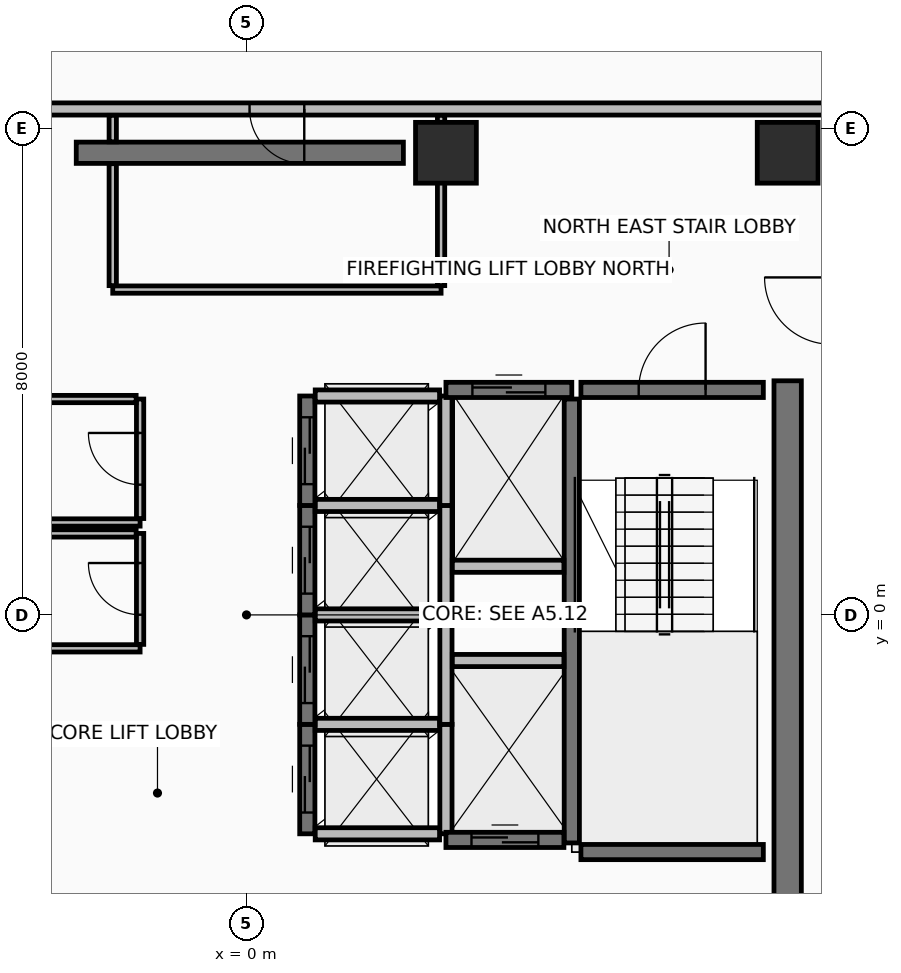
"""IFC4 building model, lengths in metres.
Left out: names, types, materials, properties, quantities, classifications, styles, units other than length and angle.
Written with IfcOpenShell. Run it as: python <this file> out.ifc"""

import sys

from ifc_helpers import new_model, si_unit, direction, frame, frame_2d, origin, origin_2d, place, context, subcontext, project, spatial, rectangle, extrude, element, fill, save


model = new_model("IFC4")
c1 = context("Model", 3, precision=1e-05, world=origin(), true_north=direction((0.0, 1.0)))
c2 = subcontext(c1, "Body", "Model", "MODEL_VIEW")
j1 = project(units=[si_unit("LENGTHUNIT", "METRE"), si_unit("PLANEANGLEUNIT", "RADIAN")], contexts=[c1])
p1 = place(None, origin())
s1 = spatial("IfcSite", under=j1, at=p1, CompositionType="ELEMENT")
p2 = place(p1, origin())
s2 = spatial("IfcBuilding", under=s1, at=p2, CompositionType="ELEMENT")
p3 = place(p2, frame((0.0, 0.0, 237.85)))
s3 = spatial("IfcBuildingStorey", under=s2, at=p3, CompositionType="ELEMENT", Elevation=237.85)
for number, where, z_axis, x_axis in (
    (1, (8.9, 7.6, 0.0), (0.0, 0.0, 1.0), (1.0, 0.0, 0.0)),
    (2, (3.28, 7.6, 0.0), (0.0, 0.0, 1.0), (1.0, 0.0, 0.0)),
):
    element("IfcColumn", number, at=place(p3, frame(where, z_axis=z_axis, x_axis=x_axis)), inside=s3, PredefinedType="COLUMN", context=c2, shape_type="SweptSolid", body=[
        extrude(rectangle(XDim=1.0, YDim=1.0, at=origin_2d()), origin(), (0.0, 0.0, 1.0), 3.6),
    ])
p4 = place(p3, frame((-2.8, 7.6, 0.0), z_axis=(0.0, 0.0, 1.0), x_axis=(1.0, 0.0, 0.0)))
e3 = element("IfcWall", 3, at=p4, inside=s3, PredefinedType="SHEAR", context=c2, shape_type="SweptSolid", body=[
    extrude(rectangle(XDim=5.38, YDim=0.35, at=frame_2d((2.69, 0.0))), origin(), (0.0, 0.0, 1.0), 3.42),
])
p5 = place(p3, frame((8.9, -6.85, 0.0), z_axis=(0.0, 0.0, 1.0), x_axis=(0.0, 1.0, 0.0)))
e4 = element("IfcWall", 4, at=p5, inside=s3, PredefinedType="SHEAR", context=c2, shape_type="SweptSolid", body=[
    extrude(rectangle(XDim=10.7, YDim=0.45, at=frame_2d((5.35, 0.0))), origin(), (0.0, 0.0, 1.0), 3.42),
])
p6 = place(p3, frame((9.62, 8.32, 0.0), z_axis=(0.0, 0.0, 1.0), x_axis=(-1.0, 0.0, 0.0)))
e5 = element("IfcWall", 5, at=p6, inside=s3, PredefinedType="PARTITIONING", context=c2, shape_type="SweptSolid", body=[
    extrude(rectangle(XDim=19.24, YDim=0.2, at=frame_2d((9.62, 0.0))), origin(), (0.0, 0.0, 1.0), 2.915),
])
p7 = place(p6, frame((8.67, 0.0, 0.0)))
e6 = element("IfcOpeningElement", 6, at=p7, cuts=e5, PredefinedType="OPENING", context=c2, shape_type="SweptSolid", body=[
    extrude(rectangle(XDim=0.9, YDim=2.1, at=frame_2d((0.45, 1.05))), frame((0.0, 0.11, 0.0), z_axis=(0.0, -1.0, 0.0), x_axis=(1.0, 0.0, 0.0)), (0.0, 0.0, 1.0), 0.22),
])
p8 = place(p6, frame((15.745, 0.0, 0.0)))
e7 = element("IfcOpeningElement", 7, at=p8, cuts=e5, PredefinedType="OPENING", context=c2, shape_type="SweptSolid", body=[
    extrude(rectangle(XDim=0.9, YDim=2.1, at=frame_2d((0.45, 1.05))), frame((0.0, 0.11, 0.0), z_axis=(0.0, -1.0, 0.0), x_axis=(1.0, 0.0, 0.0)), (0.0, 0.0, 1.0), 0.22),
])
p9 = place(p6, frame((13.795, 0.0, 0.0)))
e8 = element("IfcOpeningElement", 8, at=p9, cuts=e5, PredefinedType="OPENING", context=c2, shape_type="SweptSolid", body=[
    extrude(rectangle(XDim=0.9, YDim=2.1, at=frame_2d((0.45, 1.05))), frame((0.0, 0.11, 0.0), z_axis=(0.0, -1.0, 0.0), x_axis=(1.0, 0.0, 0.0)), (0.0, 0.0, 1.0), 0.22),
])
p10 = place(p3, frame((5.35, -3.75, 0.0), z_axis=(0.0, 0.0, 1.0), x_axis=(0.0, 1.0, 0.0)))
e9 = element("IfcWall", 9, at=p10, inside=s3, PredefinedType="SHEAR", context=c2, shape_type="SweptSolid", body=[
    extrude(rectangle(XDim=7.3, YDim=0.25, at=frame_2d((3.65, 0.0))), origin(), (0.0, 0.0, 1.0), 3.42),
])
p11 = place(p3, frame((5.5, 3.7, 0.0), z_axis=(0.0, 0.0, 1.0), x_axis=(1.0, 0.0, 0.0)))
e10 = element("IfcWall", 10, at=p11, inside=s3, PredefinedType="SHEAR", context=c2, shape_type="SweptSolid", body=[
    extrude(rectangle(XDim=3.0, YDim=0.25, at=frame_2d((1.5, 0.0))), origin(), (0.0, 0.0, 1.0), 3.42),
])
p12 = place(p11, frame((0.95, 0.0, 0.0)))
e11 = element("IfcOpeningElement", 11, at=p12, cuts=e10, PredefinedType="OPENING", context=c2, shape_type="SweptSolid", body=[
    extrude(rectangle(XDim=1.1, YDim=2.15, at=frame_2d((0.55, 1.075))), frame((0.0, 0.135, 0.0), z_axis=(0.0, -1.0, 0.0), x_axis=(1.0, 0.0, 0.0)), (0.0, 0.0, 1.0), 0.27),
])
p13 = place(p3, frame((5.5, -3.9, 0.0), z_axis=(0.0, 0.0, 1.0), x_axis=(1.0, 0.0, 0.0)))
e12 = element("IfcWall", 12, at=p13, inside=s3, PredefinedType="SHEAR", context=c2, shape_type="SweptSolid", body=[
    extrude(rectangle(XDim=3.0, YDim=0.25, at=frame_2d((1.5, 0.0))), origin(), (0.0, 0.0, 1.0), 3.42),
])
p14 = place(p3, frame((1.0, -3.6, 0.0), z_axis=(0.0, 0.0, 1.0), x_axis=(0.0, 1.0, 0.0)))
e13 = element("IfcWall", 13, at=p14, inside=s3, PredefinedType="SHEAR", context=c2, shape_type="SweptSolid", body=[
    extrude(rectangle(XDim=1.8, YDim=0.25, at=frame_2d((0.9, 0.0))), origin(), (0.0, 0.0, 1.0), 3.42),
])
p15 = place(p14, frame((0.35, 0.0, 0.0)))
e14 = element("IfcOpeningElement", 14, at=p15, cuts=e13, PredefinedType="OPENING", context=c2, shape_type="SweptSolid", body=[
    extrude(rectangle(XDim=1.1, YDim=2.2, at=frame_2d((0.55, 1.1))), frame((0.0, 0.135, 0.0), z_axis=(0.0, -1.0, 0.0), x_axis=(1.0, 0.0, 0.0)), (0.0, 0.0, 1.0), 0.27),
])
p16 = place(p3, frame((3.28, -3.6, 0.0), z_axis=(0.0, 0.0, 1.0), x_axis=(0.0, 1.0, 0.0)))
e15 = element("IfcWall", 15, at=p16, inside=s3, PredefinedType="PARTITIONING", context=c2, shape_type="SweptSolid", body=[
    extrude(rectangle(XDim=1.8, YDim=0.2, at=frame_2d((0.9, 0.0))), origin(), (0.0, 0.0, 1.0), 3.42),
])
for number, where, z_axis, x_axis in (
    (16, (1.13, -3.6, 0.0), (0.0, 0.0, 1.0), (1.0, 0.0, 0.0)),
    (17, (1.13, -1.8, 0.0), (0.0, 0.0, 1.0), (1.0, 0.0, 0.0)),
):
    element("IfcWall", number, at=place(p3, frame(where, z_axis=z_axis, x_axis=x_axis)), inside=s3, PredefinedType="PARTITIONING", context=c2, shape_type="SweptSolid", body=[
        extrude(rectangle(XDim=2.045, YDim=0.2, at=frame_2d((1.022, 0.0))), origin(), (0.0, 0.0, 1.0), 3.42),
    ])
p17 = place(p3, frame((1.0, -1.8, 0.0), z_axis=(0.0, 0.0, 1.0), x_axis=(0.0, 1.0, 0.0)))
e18 = element("IfcWall", 18, at=p17, inside=s3, PredefinedType="SHEAR", context=c2, shape_type="SweptSolid", body=[
    extrude(rectangle(XDim=1.8, YDim=0.25, at=frame_2d((0.9, 0.0))), origin(), (0.0, 0.0, 1.0), 3.42),
])
p18 = place(p17, frame((0.35, 0.0, 0.0)))
e19 = element("IfcOpeningElement", 19, at=p18, cuts=e18, PredefinedType="OPENING", context=c2, shape_type="SweptSolid", body=[
    extrude(rectangle(XDim=1.1, YDim=2.2, at=frame_2d((0.55, 1.1))), frame((0.0, 0.135, 0.0), z_axis=(0.0, -1.0, 0.0), x_axis=(1.0, 0.0, 0.0)), (0.0, 0.0, 1.0), 0.27),
])
p19 = place(p3, frame((3.28, -1.8, 0.0), z_axis=(0.0, 0.0, 1.0), x_axis=(0.0, 1.0, 0.0)))
e20 = element("IfcWall", 20, at=p19, inside=s3, PredefinedType="PARTITIONING", context=c2, shape_type="SweptSolid", body=[
    extrude(rectangle(XDim=1.8, YDim=0.2, at=frame_2d((0.9, 0.0))), origin(), (0.0, 0.0, 1.0), 3.42),
])
p20 = place(p3, frame((1.13, 0.0, 0.0), z_axis=(0.0, 0.0, 1.0), x_axis=(1.0, 0.0, 0.0)))
e21 = element("IfcWall", 21, at=p20, inside=s3, PredefinedType="PARTITIONING", context=c2, shape_type="SweptSolid", body=[
    extrude(rectangle(XDim=2.045, YDim=0.2, at=frame_2d((1.022, 0.0))), origin(), (0.0, 0.0, 1.0), 3.42),
])
p21 = place(p3, frame((1.0, 0.0, 0.0), z_axis=(0.0, 0.0, 1.0), x_axis=(0.0, 1.0, 0.0)))
e22 = element("IfcWall", 22, at=p21, inside=s3, PredefinedType="SHEAR", context=c2, shape_type="SweptSolid", body=[
    extrude(rectangle(XDim=1.8, YDim=0.25, at=frame_2d((0.9, 0.0))), origin(), (0.0, 0.0, 1.0), 3.42),
])
p22 = place(p21, frame((0.35, 0.0, 0.0)))
e23 = element("IfcOpeningElement", 23, at=p22, cuts=e22, PredefinedType="OPENING", context=c2, shape_type="SweptSolid", body=[
    extrude(rectangle(XDim=1.1, YDim=2.2, at=frame_2d((0.55, 1.1))), frame((0.0, 0.135, 0.0), z_axis=(0.0, -1.0, 0.0), x_axis=(1.0, 0.0, 0.0)), (0.0, 0.0, 1.0), 0.27),
])
p23 = place(p3, frame((3.28, 0.0, 0.0), z_axis=(0.0, 0.0, 1.0), x_axis=(0.0, 1.0, 0.0)))
e24 = element("IfcWall", 24, at=p23, inside=s3, PredefinedType="PARTITIONING", context=c2, shape_type="SweptSolid", body=[
    extrude(rectangle(XDim=1.8, YDim=0.2, at=frame_2d((0.9, 0.0))), origin(), (0.0, 0.0, 1.0), 3.42),
])
p24 = place(p3, frame((1.13, 1.8, 0.0), z_axis=(0.0, 0.0, 1.0), x_axis=(1.0, 0.0, 0.0)))
e25 = element("IfcWall", 25, at=p24, inside=s3, PredefinedType="PARTITIONING", context=c2, shape_type="SweptSolid", body=[
    extrude(rectangle(XDim=2.045, YDim=0.2, at=frame_2d((1.022, 0.0))), origin(), (0.0, 0.0, 1.0), 3.42),
])
p25 = place(p3, frame((1.0, 1.8, 0.0), z_axis=(0.0, 0.0, 1.0), x_axis=(0.0, 1.0, 0.0)))
e26 = element("IfcWall", 26, at=p25, inside=s3, PredefinedType="SHEAR", context=c2, shape_type="SweptSolid", body=[
    extrude(rectangle(XDim=1.8, YDim=0.25, at=frame_2d((0.9, 0.0))), origin(), (0.0, 0.0, 1.0), 3.42),
])
p26 = place(p25, frame((0.35, 0.0, 0.0)))
e27 = element("IfcOpeningElement", 27, at=p26, cuts=e26, PredefinedType="OPENING", context=c2, shape_type="SweptSolid", body=[
    extrude(rectangle(XDim=1.1, YDim=2.2, at=frame_2d((0.55, 1.1))), frame((0.0, 0.135, 0.0), z_axis=(0.0, -1.0, 0.0), x_axis=(1.0, 0.0, 0.0)), (0.0, 0.0, 1.0), 0.27),
])
p27 = place(p3, frame((3.28, 1.8, 0.0), z_axis=(0.0, 0.0, 1.0), x_axis=(0.0, 1.0, 0.0)))
e28 = element("IfcWall", 28, at=p27, inside=s3, PredefinedType="PARTITIONING", context=c2, shape_type="SweptSolid", body=[
    extrude(rectangle(XDim=1.8, YDim=0.2, at=frame_2d((0.9, 0.0))), origin(), (0.0, 0.0, 1.0), 3.42),
])
p28 = place(p3, frame((1.13, 3.6, 0.0), z_axis=(0.0, 0.0, 1.0), x_axis=(1.0, 0.0, 0.0)))
e29 = element("IfcWall", 29, at=p28, inside=s3, PredefinedType="PARTITIONING", context=c2, shape_type="SweptSolid", body=[
    extrude(rectangle(XDim=2.045, YDim=0.2, at=frame_2d((1.022, 0.0))), origin(), (0.0, 0.0, 1.0), 2.715),
])
p29 = place(p3, frame((3.28, 3.7, 0.0), z_axis=(0.0, 0.0, 1.0), x_axis=(1.0, 0.0, 0.0)))
e30 = element("IfcWall", 30, at=p29, inside=s3, PredefinedType="SHEAR", context=c2, shape_type="SweptSolid", body=[
    extrude(rectangle(XDim=2.07, YDim=0.25, at=frame_2d((1.035, 0.0))), origin(), (0.0, 0.0, 1.0), 3.42),
])
p30 = place(p29, frame((0.435, 0.0, 0.0)))
e31 = element("IfcOpeningElement", 31, at=p30, cuts=e30, PredefinedType="OPENING", context=c2, shape_type="SweptSolid", body=[
    extrude(rectangle(XDim=1.2, YDim=2.2, at=frame_2d((0.6, 1.1))), frame((0.0, 0.135, 0.0), z_axis=(0.0, -1.0, 0.0), x_axis=(1.0, 0.0, 0.0)), (0.0, 0.0, 1.0), 0.27),
])
p31 = place(p3, frame((3.385, 0.8, 0.0), z_axis=(0.0, 0.0, 1.0), x_axis=(1.0, 0.0, 0.0)))
e32 = element("IfcWall", 32, at=p31, inside=s3, PredefinedType="PARTITIONING", context=c2, shape_type="SweptSolid", body=[
    extrude(rectangle(XDim=1.835, YDim=0.2, at=frame_2d((0.917, 0.0))), origin(), (0.0, 0.0, 1.0), 3.42),
])
p32 = place(p3, frame((3.28, -3.7, 0.0), z_axis=(0.0, 0.0, 1.0), x_axis=(1.0, 0.0, 0.0)))
e33 = element("IfcWall", 33, at=p32, inside=s3, PredefinedType="SHEAR", context=c2, shape_type="SweptSolid", body=[
    extrude(rectangle(XDim=1.94, YDim=0.25, at=frame_2d((0.97, 0.0))), origin(), (0.0, 0.0, 1.0), 3.42),
])
p33 = place(p32, frame((0.42, 0.0, 0.0)))
e34 = element("IfcOpeningElement", 34, at=p33, cuts=e33, PredefinedType="OPENING", context=c2, shape_type="SweptSolid", body=[
    extrude(rectangle(XDim=1.1, YDim=2.2, at=frame_2d((0.55, 1.1))), frame((0.0, 0.135, 0.0), z_axis=(0.0, -1.0, 0.0), x_axis=(1.0, 0.0, 0.0)), (0.0, 0.0, 1.0), 0.27),
])
p34 = place(p3, frame((3.385, -0.75, 0.0), z_axis=(0.0, 0.0, 1.0), x_axis=(1.0, 0.0, 0.0)))
e35 = element("IfcWall", 35, at=p34, inside=s3, PredefinedType="PARTITIONING", context=c2, shape_type="SweptSolid", body=[
    extrude(rectangle(XDim=1.835, YDim=0.2, at=frame_2d((0.917, 0.0))), origin(), (0.0, 0.0, 1.0), 3.42),
])
p35 = place(p3, frame((-5.22, 1.52, 0.0), z_axis=(0.0, 0.0, 1.0), x_axis=(1.0, 0.0, 0.0)))
e36 = element("IfcWall", 36, at=p35, inside=s3, PredefinedType="PARTITIONING", context=c2, shape_type="SweptSolid", body=[
    extrude(rectangle(XDim=3.47, YDim=0.12, at=frame_2d((1.735, 0.0))), origin(), (0.0, 0.0, 1.0), 3.42),
])
p36 = place(p3, frame((-1.75, 1.585, 0.0), z_axis=(0.0, 0.0, 1.0), x_axis=(0.0, 1.0, 0.0)))
e37 = element("IfcWall", 37, at=p36, inside=s3, PredefinedType="PARTITIONING", context=c2, shape_type="SweptSolid", body=[
    extrude(rectangle(XDim=1.965, YDim=0.12, at=frame_2d((0.982, 0.0))), origin(), (0.0, 0.0, 1.0), 3.42),
])
p37 = place(p36, frame((0.557, 0.0, 0.0)))
e38 = element("IfcOpeningElement", 38, at=p37, cuts=e37, PredefinedType="OPENING", context=c2, shape_type="SweptSolid", body=[
    extrude(rectangle(XDim=0.85, YDim=2.1, at=frame_2d((0.425, 1.05))), frame((0.0, 0.07, 0.0), z_axis=(0.0, -1.0, 0.0), x_axis=(1.0, 0.0, 0.0)), (0.0, 0.0, 1.0), 0.14),
])
p38 = place(p3, frame((-1.815, 3.55, 0.0), z_axis=(0.0, 0.0, 1.0), x_axis=(-1.0, 0.0, 0.0)))
e39 = element("IfcWall", 39, at=p38, inside=s3, PredefinedType="PARTITIONING", context=c2, shape_type="SweptSolid", body=[
    extrude(rectangle(XDim=3.405, YDim=0.12, at=frame_2d((1.703, 0.0))), origin(), (0.0, 0.0, 1.0), 3.42),
])
p39 = place(p3, frame((-5.22, -0.55, 0.0), z_axis=(0.0, 0.0, 1.0), x_axis=(1.0, 0.0, 0.0)))
e40 = element("IfcWall", 40, at=p39, inside=s3, PredefinedType="PARTITIONING", context=c2, shape_type="SweptSolid", body=[
    extrude(rectangle(XDim=3.47, YDim=0.12, at=frame_2d((1.735, 0.0))), origin(), (0.0, 0.0, 1.0), 3.42),
])
p40 = place(p3, frame((-1.75, -0.485, 0.0), z_axis=(0.0, 0.0, 1.0), x_axis=(0.0, 1.0, 0.0)))
e41 = element("IfcWall", 41, at=p40, inside=s3, PredefinedType="PARTITIONING", context=c2, shape_type="SweptSolid", body=[
    extrude(rectangle(XDim=1.825, YDim=0.12, at=frame_2d((0.913, 0.0))), origin(), (0.0, 0.0, 1.0), 3.42),
])
p41 = place(p40, frame((0.488, 0.0, 0.0)))
e42 = element("IfcOpeningElement", 42, at=p41, cuts=e41, PredefinedType="OPENING", context=c2, shape_type="SweptSolid", body=[
    extrude(rectangle(XDim=0.85, YDim=2.1, at=frame_2d((0.425, 1.05))), frame((0.0, 0.07, 0.0), z_axis=(0.0, -1.0, 0.0), x_axis=(1.0, 0.0, 0.0)), (0.0, 0.0, 1.0), 0.14),
])
p42 = place(p3, frame((-1.815, 1.34, 0.0), z_axis=(0.0, 0.0, 1.0), x_axis=(-1.0, 0.0, 0.0)))
e43 = element("IfcWall", 43, at=p42, inside=s3, PredefinedType="PARTITIONING", context=c2, shape_type="SweptSolid", body=[
    extrude(rectangle(XDim=3.405, YDim=0.12, at=frame_2d((1.703, 0.0))), origin(), (0.0, 0.0, 1.0), 3.42),
])
p43 = place(p3, frame((-2.2, 5.35, 0.0), z_axis=(0.0, 0.0, 1.0), x_axis=(1.0, 0.0, 0.0)))
e44 = element("IfcWall", 44, at=p43, inside=s3, PredefinedType="PARTITIONING", context=c2, shape_type="SweptSolid", body=[
    extrude(rectangle(XDim=5.4, YDim=0.12, at=frame_2d((2.7, 0.0))), origin(), (0.0, 0.0, 1.0), 2.715),
])
p44 = place(p3, frame((3.2, 5.415, 0.0), z_axis=(0.0, 0.0, 1.0), x_axis=(0.0, 1.0, 0.0)))
e45 = element("IfcWall", 45, at=p44, inside=s3, PredefinedType="PARTITIONING", context=c2, shape_type="SweptSolid", body=[
    extrude(rectangle(XDim=2.8, YDim=0.12, at=frame_2d((1.4, 0.0))), origin(), (0.0, 0.0, 1.0), 2.715),
])
p45 = place(p3, frame((-2.2, 8.215, 0.0), z_axis=(0.0, 0.0, 1.0), x_axis=(0.0, -1.0, 0.0)))
e46 = element("IfcWall", 46, at=p45, inside=s3, PredefinedType="PARTITIONING", context=c2, shape_type="SweptSolid", body=[
    extrude(rectangle(XDim=0.435, YDim=0.12, at=frame_2d((0.218, 0.0))), origin(), (0.0, 0.0, 1.0), 2.715),
])
p46 = place(p3, frame((-2.2, 7.42, 0.0), z_axis=(0.0, 0.0, 1.0), x_axis=(0.0, -1.0, 0.0)))
e47 = element("IfcWall", 47, at=p46, inside=s3, PredefinedType="PARTITIONING", context=c2, shape_type="SweptSolid", body=[
    extrude(rectangle(XDim=2.005, YDim=0.12, at=frame_2d((1.002, 0.0))), origin(), (0.0, 0.0, 1.0), 2.715),
])
p47 = place(p12, frame((1.1, 0.0, 0.0), z_axis=(0.0, 0.0, 1.0), x_axis=(-1.0, 0.0, 0.0)))
e48 = element("IfcDoor", 48, at=p47, inside=s3, OperationType="SINGLE_SWING_LEFT", PredefinedType="DOOR", context=c2, shape_type="SweptSolid", body=[
    extrude(rectangle(XDim=1.1, YDim=2.15, at=frame_2d((0.55, 1.075))), frame((0.0, 0.025, 0.0), z_axis=(0.0, -1.0, 0.0), x_axis=(1.0, 0.0, 0.0)), (0.0, 0.0, 1.0), 0.05),
])
fill(e11, e48)
p48 = place(p15, origin())
e49 = element("IfcDoor", 49, at=p48, inside=s3, OperationType="SLIDING_TO_LEFT", PredefinedType="DOOR", context=c2, shape_type="SweptSolid", body=[
    extrude(rectangle(XDim=1.1, YDim=2.2, at=frame_2d((0.55, 1.1))), frame((0.0, 0.025, 0.0), z_axis=(0.0, -1.0, 0.0), x_axis=(1.0, 0.0, 0.0)), (0.0, 0.0, 1.0), 0.05),
])
fill(e14, e49)
p49 = place(p18, origin())
e50 = element("IfcDoor", 50, at=p49, inside=s3, OperationType="SLIDING_TO_LEFT", PredefinedType="DOOR", context=c2, shape_type="SweptSolid", body=[
    extrude(rectangle(XDim=1.1, YDim=2.2, at=frame_2d((0.55, 1.1))), frame((0.0, 0.025, 0.0), z_axis=(0.0, -1.0, 0.0), x_axis=(1.0, 0.0, 0.0)), (0.0, 0.0, 1.0), 0.05),
])
fill(e19, e50)
p50 = place(p22, origin())
e51 = element("IfcDoor", 51, at=p50, inside=s3, OperationType="SLIDING_TO_LEFT", PredefinedType="DOOR", context=c2, shape_type="SweptSolid", body=[
    extrude(rectangle(XDim=1.1, YDim=2.2, at=frame_2d((0.55, 1.1))), frame((0.0, 0.025, 0.0), z_axis=(0.0, -1.0, 0.0), x_axis=(1.0, 0.0, 0.0)), (0.0, 0.0, 1.0), 0.05),
])
fill(e23, e51)
p51 = place(p26, origin())
e52 = element("IfcDoor", 52, at=p51, inside=s3, OperationType="SLIDING_TO_LEFT", PredefinedType="DOOR", context=c2, shape_type="SweptSolid", body=[
    extrude(rectangle(XDim=1.1, YDim=2.2, at=frame_2d((0.55, 1.1))), frame((0.0, 0.025, 0.0), z_axis=(0.0, -1.0, 0.0), x_axis=(1.0, 0.0, 0.0)), (0.0, 0.0, 1.0), 0.05),
])
fill(e27, e52)
p52 = place(p30, origin())
e53 = element("IfcDoor", 53, at=p52, inside=s3, OperationType="SLIDING_TO_RIGHT", PredefinedType="DOOR", context=c2, shape_type="SweptSolid", body=[
    extrude(rectangle(XDim=1.2, YDim=2.2, at=frame_2d((0.6, 1.1))), frame((0.0, 0.025, 0.0), z_axis=(0.0, -1.0, 0.0), x_axis=(1.0, 0.0, 0.0)), (0.0, 0.0, 1.0), 0.05),
])
fill(e31, e53)
p53 = place(p33, origin())
e54 = element("IfcDoor", 54, at=p53, inside=s3, OperationType="SLIDING_TO_LEFT", PredefinedType="DOOR", context=c2, shape_type="SweptSolid", body=[
    extrude(rectangle(XDim=1.1, YDim=2.2, at=frame_2d((0.55, 1.1))), frame((0.0, 0.025, 0.0), z_axis=(0.0, -1.0, 0.0), x_axis=(1.0, 0.0, 0.0)), (0.0, 0.0, 1.0), 0.05),
])
fill(e34, e54)
p54 = place(p37, frame((0.85, 0.0, 0.0), z_axis=(0.0, 0.0, 1.0), x_axis=(-1.0, 0.0, 0.0)))
e55 = element("IfcDoor", 55, at=p54, inside=s3, OperationType="SINGLE_SWING_RIGHT", PredefinedType="DOOR", context=c2, shape_type="SweptSolid", body=[
    extrude(rectangle(XDim=0.85, YDim=2.1, at=frame_2d((0.425, 1.05))), frame((0.0, 0.025, 0.0), z_axis=(0.0, -1.0, 0.0), x_axis=(1.0, 0.0, 0.0)), (0.0, 0.0, 1.0), 0.05),
])
fill(e38, e55)
p55 = place(p41, frame((0.85, 0.0, 0.0), z_axis=(0.0, 0.0, 1.0), x_axis=(-1.0, 0.0, 0.0)))
e56 = element("IfcDoor", 56, at=p55, inside=s3, OperationType="SINGLE_SWING_RIGHT", PredefinedType="DOOR", context=c2, shape_type="SweptSolid", body=[
    extrude(rectangle(XDim=0.85, YDim=2.1, at=frame_2d((0.425, 1.05))), frame((0.0, 0.025, 0.0), z_axis=(0.0, -1.0, 0.0), x_axis=(1.0, 0.0, 0.0)), (0.0, 0.0, 1.0), 0.05),
])
fill(e42, e56)
p56 = place(p7, origin())
e57 = element("IfcDoor", 57, at=p56, inside=s3, OperationType="SINGLE_SWING_LEFT", PredefinedType="DOOR", context=c2, shape_type="SweptSolid", body=[
    extrude(rectangle(XDim=0.9, YDim=2.1, at=frame_2d((0.45, 1.05))), frame((0.0, 0.025, 0.0), z_axis=(0.0, -1.0, 0.0), x_axis=(1.0, 0.0, 0.0)), (0.0, 0.0, 1.0), 0.05),
])
fill(e6, e57)
save(model, sys.argv[1])
